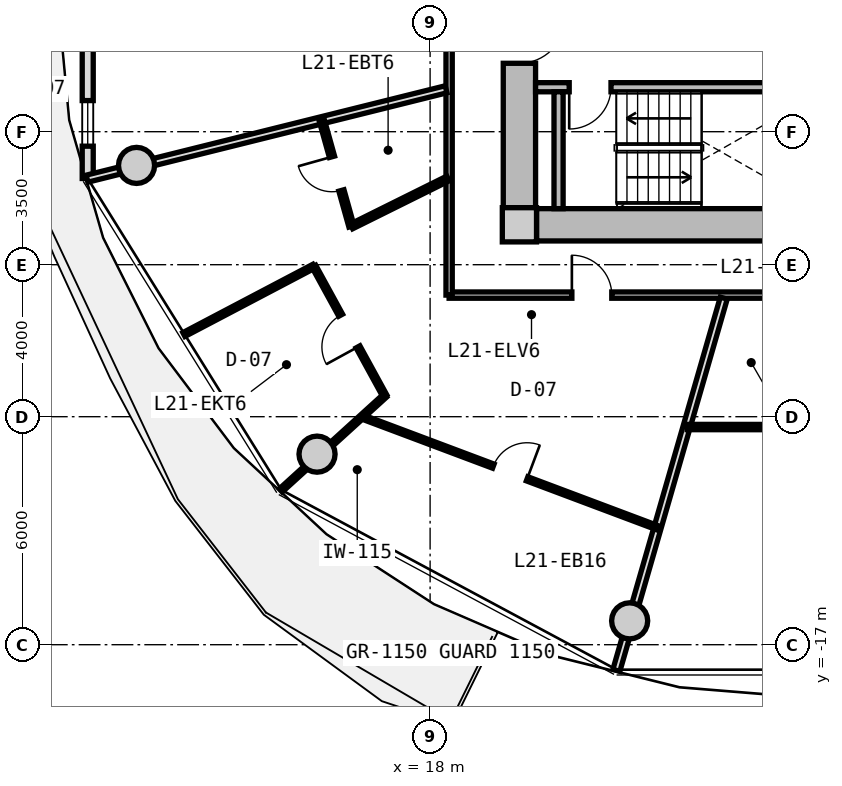
"""IFC4 building model, lengths in metres.
Left out: names, types, materials, properties, quantities, classifications, styles, units other than length and angle.
Written with IfcOpenShell. Run it as: python <this file> out.ifc"""

import sys

from ifc_helpers import new_model, si_unit, direction, frame, frame_2d, origin, origin_2d, place, context, subcontext, project, spatial, rectangle, circle, extrude, source, transform, mapped, element, fill, save


model = new_model("IFC4")
c1 = context("Model", 3, precision=1e-05, world=origin(), true_north=direction((0.0, 1.0)))
c2 = subcontext(c1, "Body", "Model", "MODEL_VIEW")
j1 = project(units=[si_unit("LENGTHUNIT", "METRE"), si_unit("PLANEANGLEUNIT", "RADIAN")], contexts=[c1])
p1 = place(None, origin())
s1 = spatial("IfcSite", under=j1, at=p1, CompositionType="ELEMENT")
p2 = place(p1, origin())
s2 = spatial("IfcBuilding", under=s1, at=p2, CompositionType="ELEMENT")
p3 = place(p2, frame((0.0, 0.0, 70.4)))
s3 = spatial("IfcBuildingStorey", under=s2, at=p3, CompositionType="ELEMENT", Elevation=70.4)
m1 = source(origin(), c2, "Body", "SweptSolid", [
    extrude(rectangle(XDim=0.9, YDim=0.9, at=origin_2d()), origin(), (0.0, 0.0, 1.0), 3.05),
])
p4 = place(p3, frame((20.35, -5.95, 0.0), z_axis=(0.0, 0.0, 1.0), x_axis=(1.0, 0.0, 0.0)))
e1 = element("IfcColumn", 1, at=p4, inside=s3, PredefinedType="COLUMN", context=c2, shape_type="MappedRepresentation", body=[
    mapped(m1, transform((0.0, 0.0, 0.0), x_axis=(1.0, 0.0, 0.0), y_axis=(0.0, 1.0, 0.0), z_axis=(0.0, 0.0, 1.0), scale=1.0)),
])
m2 = source(origin(), c2, "Body", "SweptSolid", [
    extrude(rectangle(XDim=14.4, YDim=0.85, at=frame_2d((7.2, 0.0))), origin(), (0.0, 0.0, 1.0), 2.73),
])
p5 = place(p3, frame((35.2, -5.95, 0.0), z_axis=(0.0, 0.0, 1.0), x_axis=(-1.0, 0.0, 0.0)))
e2 = element("IfcWall", 2, at=p5, inside=s3, PredefinedType="SHEAR", context=c2, shape_type="MappedRepresentation", body=[
    mapped(m2, transform((0.0, 0.0, 0.0), x_axis=(1.0, 0.0, 0.0), y_axis=(0.0, 1.0, 0.0), z_axis=(0.0, 0.0, 1.0), scale=1.0)),
])
m3 = source(origin(), c2, "Body", "SweptSolid", [
    extrude(rectangle(XDim=11.0, YDim=0.85, at=frame_2d((5.5, 0.0))), origin(), (0.0, 0.0, 1.0), 2.73),
])
p6 = place(p3, frame((20.35, -5.5, 0.0), z_axis=(0.0, 0.0, 1.0), x_axis=(0.0, 1.0, 0.0)))
e3 = element("IfcWall", 3, at=p6, inside=s3, PredefinedType="SHEAR", context=c2, shape_type="MappedRepresentation", body=[
    mapped(m3, transform((0.0, 0.0, 0.0), x_axis=(1.0, 0.0, 0.0), y_axis=(0.0, 1.0, 0.0), z_axis=(0.0, 0.0, 1.0), scale=1.0)),
])
p7 = place(p6, frame((3.8, 0.0, 0.0)))
e4 = element("IfcOpeningElement", 4, at=p7, cuts=e3, PredefinedType="OPENING", context=c2, shape_type="SweptSolid", body=[
    extrude(rectangle(XDim=1.2, YDim=2.15, at=frame_2d((0.6, 1.075))), frame((0.0, 0.435, 0.0), z_axis=(0.0, -1.0, 0.0), x_axis=(1.0, 0.0, 0.0)), (0.0, 0.0, 1.0), 0.87),
])
m4 = source(origin(), c2, "Body", "SweptSolid", [
    extrude(circle(Radius=0.475, at=origin_2d()), origin(), (0.0, 0.0, 1.0), 3.05),
])
for number, where, z_axis, x_axis in (
    (5, (10.275, -4.387, 0.0), (0.0, 0.0, 1.0), (1.0, 0.0, 0.0)),
    (6, (15.025, -11.985, 0.0), (0.0, 0.0, 1.0), (1.0, 0.0, 0.0)),
    (7, (23.251, -16.373, 0.0), (0.0, 0.0, 1.0), (1.0, 0.0, 0.0)),
):
    element("IfcColumn", number, at=place(p3, frame(where, z_axis=z_axis, x_axis=x_axis)), inside=s3, PredefinedType="COLUMN", context=c2, shape_type="MappedRepresentation", body=[
        mapped(m4, transform((0.0, 0.0, 0.0), x_axis=(1.0, 0.0, 0.0), y_axis=(0.0, 1.0, 0.0), z_axis=(0.0, 0.0, 1.0), scale=1.0)),
    ])
m5 = source(origin(), c2, "Body", "SweptSolid", [
    extrude(rectangle(XDim=9.462, YDim=0.29, at=frame_2d((4.731, 0.0))), origin(), (0.0, 0.0, 1.0), 2.73),
])
p8 = place(p3, frame((8.99, -4.731, 0.0), z_axis=(0.0, 0.0, 1.0), x_axis=(0.0, 1.0, 0.0)))
e8 = element("IfcWall", 8, at=p8, inside=s3, PredefinedType="SOLIDWALL", context=c2, shape_type="MappedRepresentation", body=[
    mapped(m5, transform((0.0, 0.0, 0.0), x_axis=(1.0, 0.0, 0.0), y_axis=(0.0, 1.0, 0.0), z_axis=(0.0, 0.0, 1.0), scale=1.0)),
])
p9 = place(p8, frame((7.3, 0.0, 0.0)))
e9 = element("IfcOpeningElement", 9, at=p9, cuts=e8, PredefinedType="OPENING", context=c2, shape_type="SweptSolid", body=[
    extrude(rectangle(XDim=1.15, YDim=2.25, at=frame_2d((0.575, 1.125))), frame((0.0, 0.155, 0.0), z_axis=(0.0, -1.0, 0.0), x_axis=(1.0, 0.0, 0.0)), (0.0, 0.0, 1.0), 0.31),
])
p10 = place(p8, frame((0.85, 0.0, 0.85)))
e10 = element("IfcOpeningElement", 10, at=p10, cuts=e8, PredefinedType="OPENING", context=c2, shape_type="SweptSolid", body=[
    extrude(rectangle(XDim=1.2, YDim=1.5, at=frame_2d((0.6, 0.75))), frame((0.0, 0.155, 0.0), z_axis=(0.0, -1.0, 0.0), x_axis=(1.0, 0.0, 0.0)), (0.0, 0.0, 1.0), 0.31),
])
m6 = source(origin(), c2, "Body", "SweptSolid", [
    extrude(rectangle(XDim=7.765, YDim=0.24, at=frame_2d((3.883, 0.0))), origin(), (0.0, 0.0, 1.0), 2.73),
])
p11 = place(p3, frame((20.775, -2.33, 0.0), z_axis=(0.0, 0.0, 1.0), x_axis=(1.0, 0.0, 0.0)))
e11 = element("IfcWall", 11, at=p11, inside=s3, PredefinedType="PARTITIONING", context=c2, shape_type="MappedRepresentation", body=[
    mapped(m6, transform((0.0, 0.0, 0.0), x_axis=(1.0, 0.0, 0.0), y_axis=(0.0, 1.0, 0.0), z_axis=(0.0, 0.0, 1.0), scale=1.0)),
])
p12 = place(p11, frame((0.885, 0.0, 0.0)))
e12 = element("IfcOpeningElement", 12, at=p12, cuts=e11, PredefinedType="OPENING", context=c2, shape_type="SweptSolid", body=[
    extrude(rectangle(XDim=1.1, YDim=2.15, at=frame_2d((0.55, 1.075))), frame((0.0, 0.13, 0.0), z_axis=(0.0, -1.0, 0.0), x_axis=(1.0, 0.0, 0.0)), (0.0, 0.0, 1.0), 0.26),
])
m7 = source(origin(), c2, "Body", "SweptSolid", [
    extrude(rectangle(XDim=3.075, YDim=0.24, at=frame_2d((1.538, 0.0))), origin(), (0.0, 0.0, 1.0), 2.73),
])
p13 = place(p3, frame((21.38, -5.525, 0.0), z_axis=(0.0, 0.0, 1.0), x_axis=(0.0, 1.0, 0.0)))
e13 = element("IfcWall", 13, at=p13, inside=s3, PredefinedType="PARTITIONING", context=c2, shape_type="MappedRepresentation", body=[
    mapped(m7, transform((0.0, 0.0, 0.0), x_axis=(1.0, 0.0, 0.0), y_axis=(0.0, 1.0, 0.0), z_axis=(0.0, 0.0, 1.0), scale=1.0)),
])
m8 = source(origin(), c2, "Body", "SweptSolid", [
    extrude(rectangle(XDim=19.0, YDim=0.165, at=frame_2d((9.5, 0.0))), origin(), (0.0, 0.0, 1.0), 2.715),
])
p14 = place(p3, frame((37.5, -7.8, 0.0), z_axis=(0.0, 0.0, 1.0), x_axis=(-1.0, 0.0, 0.0)))
e14 = element("IfcWall", 14, at=p14, inside=s3, PredefinedType="PARTITIONING", context=c2, shape_type="MappedRepresentation", body=[
    mapped(m8, transform((0.0, 0.0, 0.0), x_axis=(1.0, 0.0, 0.0), y_axis=(0.0, 1.0, 0.0), z_axis=(0.0, 0.0, 1.0), scale=1.0)),
])
p15 = place(p14, frame((14.72, 0.0, 0.0)))
e15 = element("IfcOpeningElement", 15, at=p15, cuts=e14, PredefinedType="OPENING", context=c2, shape_type="SweptSolid", body=[
    extrude(rectangle(XDim=1.05, YDim=2.15, at=frame_2d((0.525, 1.075))), frame((0.0, 0.093, 0.0), z_axis=(0.0, -1.0, 0.0), x_axis=(1.0, 0.0, 0.0)), (0.0, 0.0, 1.0), 0.185),
])
p16 = place(p14, frame((4.847, 0.0, 0.0)))
e16 = element("IfcOpeningElement", 16, at=p16, cuts=e14, PredefinedType="OPENING", context=c2, shape_type="SweptSolid", body=[
    extrude(rectangle(XDim=1.05, YDim=2.15, at=frame_2d((0.525, 1.075))), frame((0.0, 0.093, 0.0), z_axis=(0.0, -1.0, 0.0), x_axis=(1.0, 0.0, 0.0)), (0.0, 0.0, 1.0), 0.185),
])
m9 = source(origin(), c2, "Body", "SweptSolid", [
    extrude(rectangle(XDim=15.6, YDim=0.165, at=frame_2d((7.8, 0.0))), origin(), (0.0, 0.0, 1.0), 2.715),
])
p17 = place(p3, frame((18.5, -7.8, 0.0), z_axis=(0.0, 0.0, 1.0), x_axis=(0.0, 1.0, 0.0)))
e17 = element("IfcWall", 17, at=p17, inside=s3, PredefinedType="PARTITIONING", context=c2, shape_type="MappedRepresentation", body=[
    mapped(m9, transform((0.0, 0.0, 0.0), x_axis=(1.0, 0.0, 0.0), y_axis=(0.0, 1.0, 0.0), z_axis=(0.0, 0.0, 1.0), scale=1.0)),
])
p18 = place(p17, frame((14.215, 0.0, 0.0)))
e18 = element("IfcOpeningElement", 18, at=p18, cuts=e17, PredefinedType="OPENING", context=c2, shape_type="SweptSolid", body=[
    extrude(rectangle(XDim=0.92, YDim=2.1, at=frame_2d((0.46, 1.05))), frame((0.0, 0.093, 0.0), z_axis=(0.0, -1.0, 0.0), x_axis=(1.0, 0.0, 0.0)), (0.0, 0.0, 1.0), 0.185),
])
p19 = place(p17, frame((11.609, 0.0, 0.0)))
e19 = element("IfcOpeningElement", 19, at=p19, cuts=e17, PredefinedType="OPENING", context=c2, shape_type="SweptSolid", body=[
    extrude(rectangle(XDim=0.92, YDim=2.1, at=frame_2d((0.46, 1.05))), frame((0.0, 0.093, 0.0), z_axis=(0.0, -1.0, 0.0), x_axis=(1.0, 0.0, 0.0)), (0.0, 0.0, 1.0), 0.185),
])
p20 = place(p17, frame((7.175, 0.0, 0.0)))
e20 = element("IfcOpeningElement", 20, at=p20, cuts=e17, PredefinedType="OPENING", context=c2, shape_type="SweptSolid", body=[
    extrude(rectangle(XDim=1.25, YDim=2.2, at=frame_2d((0.625, 1.1))), frame((0.0, 0.093, 0.0), z_axis=(0.0, -1.0, 0.0), x_axis=(1.0, 0.0, 0.0)), (0.0, 0.0, 1.0), 0.185),
])
m10 = source(origin(), c2, "Body", "SweptSolid", [
    extrude(rectangle(XDim=9.737, YDim=0.19, at=frame_2d((4.869, 0.0))), origin(), (0.0, 0.0, 1.0), 2.165),
])
p21 = place(p3, frame((18.42, -2.385, 0.0), z_axis=(0.0, 0.0, 1.0), x_axis=(-0.970392716238, -0.241532557375, 0.0)))
e21 = element("IfcWall", 21, at=p21, inside=s3, PredefinedType="PARTITIONING", context=c2, shape_type="MappedRepresentation", body=[
    mapped(m10, transform((0.0, 0.0, 0.0), x_axis=(1.0, 0.0, 0.0), y_axis=(0.0, 1.0, 0.0), z_axis=(0.0, 0.0, 1.0), scale=1.0)),
])
m11 = source(origin(), c2, "Body", "SweptSolid", [
    extrude(rectangle(XDim=10.196, YDim=0.19, at=frame_2d((5.098, 0.0))), origin(), (0.0, 0.0, 1.0), 2.165),
])
p22 = place(p3, frame((25.727, -7.88, 0.0), z_axis=(0.0, 0.0, 1.0), x_axis=(-0.277136420347, -0.960830580549, 0.0)))
e22 = element("IfcWall", 22, at=p22, inside=s3, PredefinedType="PARTITIONING", context=c2, shape_type="MappedRepresentation", body=[
    mapped(m11, transform((0.0, 0.0, 0.0), x_axis=(1.0, 0.0, 0.0), y_axis=(0.0, 1.0, 0.0), z_axis=(0.0, 0.0, 1.0), scale=1.0)),
])
m12 = source(origin(), c2, "Body", "SweptSolid", [
    extrude(rectangle(XDim=8.32, YDim=0.115, at=frame_2d((4.16, 0.0))), origin(), (0.0, 0.0, 1.0), 2.715),
])
p23 = place(p3, frame((16.214, -11.006, 0.0), z_axis=(0.0, 0.0, 1.0), x_axis=(0.936180763098, -0.351518959382, 0.0)))
e23 = element("IfcWall", 23, at=p23, inside=s3, PredefinedType="PARTITIONING", context=c2, shape_type="MappedRepresentation", body=[
    mapped(m12, transform((0.0, 0.0, 0.0), x_axis=(1.0, 0.0, 0.0), y_axis=(0.0, 1.0, 0.0), z_axis=(0.0, 0.0, 1.0), scale=1.0)),
])
p24 = place(p23, frame((3.685, 0.0, 0.0)))
e24 = element("IfcOpeningElement", 24, at=p24, cuts=e23, PredefinedType="OPENING", context=c2, shape_type="SweptSolid", body=[
    extrude(rectangle(XDim=0.95, YDim=2.1, at=frame_2d((0.475, 1.05))), frame((0.0, 0.067, 0.0), z_axis=(0.0, -1.0, 0.0), x_axis=(1.0, 0.0, 0.0)), (0.0, 0.0, 1.0), 0.135),
])
m13 = source(origin(), c2, "Body", "SweptSolid", [
    extrude(rectangle(XDim=3.713, YDim=0.115, at=frame_2d((1.856, 0.0))), origin(), (0.0, 0.0, 1.0), 2.165),
])
p25 = place(p3, frame((16.817, -10.442, 0.0), z_axis=(0.0, 0.0, 1.0), x_axis=(-0.739877587881, -0.67274152165, 0.0)))
e25 = element("IfcWall", 25, at=p25, inside=s3, PredefinedType="PARTITIONING", context=c2, shape_type="MappedRepresentation", body=[
    mapped(m13, transform((0.0, 0.0, 0.0), x_axis=(1.0, 0.0, 0.0), y_axis=(0.0, 1.0, 0.0), z_axis=(0.0, 0.0, 1.0), scale=1.0)),
])
m14 = source(origin(), c2, "Body", "SweptSolid", [
    extrude(rectangle(XDim=2.834, YDim=0.14, at=frame_2d((1.417, 0.0))), origin(), (0.0, 0.0, 1.0), 2.715),
])
p26 = place(p3, frame((18.47, -4.732, 0.0), z_axis=(0.0, 0.0, 1.0), x_axis=(-0.895681174462, -0.444696788513, 0.0)))
e26 = element("IfcWall", 26, at=p26, inside=s3, PredefinedType="PARTITIONING", context=c2, shape_type="MappedRepresentation", body=[
    mapped(m14, transform((0.0, 0.0, 0.0), x_axis=(1.0, 0.0, 0.0), y_axis=(0.0, 1.0, 0.0), z_axis=(0.0, 0.0, 1.0), scale=1.0)),
])
m15 = source(origin(), c2, "Body", "SweptSolid", [
    extrude(rectangle(XDim=2.885, YDim=0.14, at=frame_2d((1.442, 0.0))), origin(), (0.0, 0.0, 1.0), 2.715),
])
p27 = place(p3, frame((15.931, -5.992, 0.0), z_axis=(0.0, 0.0, 1.0), x_axis=(-0.269799431837, 0.962916541856, 0.0)))
e27 = element("IfcWall", 27, at=p27, inside=s3, PredefinedType="PARTITIONING", context=c2, shape_type="MappedRepresentation", body=[
    mapped(m15, transform((0.0, 0.0, 0.0), x_axis=(1.0, 0.0, 0.0), y_axis=(0.0, 1.0, 0.0), z_axis=(0.0, 0.0, 1.0), scale=1.0)),
])
p28 = place(p27, frame((0.982, 0.0, 0.0)))
e28 = element("IfcOpeningElement", 28, at=p28, cuts=e27, PredefinedType="OPENING", context=c2, shape_type="SweptSolid", body=[
    extrude(rectangle(XDim=0.92, YDim=2.1, at=frame_2d((0.46, 1.05))), frame((0.0, 0.08, 0.0), z_axis=(0.0, -1.0, 0.0), x_axis=(1.0, 0.0, 0.0)), (0.0, 0.0, 1.0), 0.16),
])
m16 = source(origin(), c2, "Body", "SweptSolid", [
    extrude(rectangle(XDim=3.864, YDim=0.115, at=frame_2d((1.932, 0.0))), origin(), (0.0, 0.0, 1.0), 2.715),
])
p29 = place(p3, frame((14.94, -7.041, 0.0), z_axis=(0.0, 0.0, 1.0), x_axis=(-0.885194959803, -0.465220252289, 0.0)))
e29 = element("IfcWall", 29, at=p29, inside=s3, PredefinedType="PARTITIONING", context=c2, shape_type="MappedRepresentation", body=[
    mapped(m16, transform((0.0, 0.0, 0.0), x_axis=(1.0, 0.0, 0.0), y_axis=(0.0, 1.0, 0.0), z_axis=(0.0, 0.0, 1.0), scale=1.0)),
])
m17 = source(origin(), c2, "Body", "SweptSolid", [
    extrude(rectangle(XDim=3.888, YDim=0.115, at=frame_2d((1.944, 0.0))), origin(), (0.0, 0.0, 1.0), 2.715),
])
p30 = place(p3, frame((14.94, -7.041, 0.0), z_axis=(0.0, 0.0, 1.0), x_axis=(0.480382482853, -0.877059103007, 0.0)))
e30 = element("IfcWall", 30, at=p30, inside=s3, PredefinedType="PARTITIONING", context=c2, shape_type="MappedRepresentation", body=[
    mapped(m17, transform((0.0, 0.0, 0.0), x_axis=(1.0, 0.0, 0.0), y_axis=(0.0, 1.0, 0.0), z_axis=(0.0, 0.0, 1.0), scale=1.0)),
])
p31 = place(p30, frame((1.469, 0.0, 0.0)))
e31 = element("IfcOpeningElement", 31, at=p31, cuts=e30, PredefinedType="OPENING", context=c2, shape_type="SweptSolid", body=[
    extrude(rectangle(XDim=0.95, YDim=2.1, at=frame_2d((0.475, 1.05))), frame((0.0, 0.067, 0.0), z_axis=(0.0, -1.0, 0.0), x_axis=(1.0, 0.0, 0.0)), (0.0, 0.0, 1.0), 0.135),
])
m18 = source(origin(), c2, "Body", "SweptSolid", [
    extrude(rectangle(XDim=2.813, YDim=0.14, at=frame_2d((1.406, 0.0))), origin(), (0.0, 0.0, 1.0), 2.715),
])
p32 = place(p3, frame((27.578, -11.273, 0.0), z_axis=(0.0, 0.0, 1.0), x_axis=(-0.99999981542, 0.000607586035, 0.0)))
e32 = element("IfcWall", 32, at=p32, inside=s3, PredefinedType="PARTITIONING", context=c2, shape_type="MappedRepresentation", body=[
    mapped(m18, transform((0.0, 0.0, 0.0), x_axis=(1.0, 0.0, 0.0), y_axis=(0.0, 1.0, 0.0), z_axis=(0.0, 0.0, 1.0), scale=1.0)),
])
m19 = source(origin(), c2, "Body", "SweptSolid", [
    extrude(rectangle(XDim=1.2, YDim=1.5, at=frame_2d((0.6, 0.75))), frame((0.0, 0.03, 0.0), z_axis=(0.0, -1.0, 0.0), x_axis=(1.0, 0.0, 0.0)), (0.0, 0.0, 1.0), 0.06),
])
p33 = place(p10, origin())
e33 = element("IfcWindow", 33, at=p33, inside=s3, PartitioningType="SINGLE_PANEL", PredefinedType="WINDOW", context=c2, shape_type="MappedRepresentation", body=[
    mapped(m19, transform((0.0, 0.0, 0.0), x_axis=(1.0, 0.0, 0.0), y_axis=(0.0, 1.0, 0.0), z_axis=(0.0, 0.0, 1.0), scale=1.0)),
])
fill(e10, e33)
m20 = source(origin(), c2, "Body", "SweptSolid", [
    extrude(rectangle(XDim=1.1, YDim=2.15, at=frame_2d((0.55, 1.075))), frame((0.0, 0.025, 0.0), z_axis=(0.0, -1.0, 0.0), x_axis=(1.0, 0.0, 0.0)), (0.0, 0.0, 1.0), 0.05),
])
p34 = place(p12, frame((1.1, 0.0, 0.0), z_axis=(0.0, 0.0, 1.0), x_axis=(-1.0, 0.0, 0.0)))
e34 = element("IfcDoor", 34, at=p34, inside=s3, OperationType="SINGLE_SWING_RIGHT", PredefinedType="DOOR", context=c2, shape_type="MappedRepresentation", body=[
    mapped(m20, transform((0.0, 0.0, 0.0), x_axis=(1.0, 0.0, 0.0), y_axis=(0.0, 1.0, 0.0), z_axis=(0.0, 0.0, 1.0), scale=1.0)),
])
fill(e12, e34)
m21 = source(origin(), c2, "Body", "SweptSolid", [
    extrude(rectangle(XDim=1.2, YDim=2.15, at=frame_2d((0.6, 1.075))), frame((0.0, 0.025, 0.0), z_axis=(0.0, -1.0, 0.0), x_axis=(1.0, 0.0, 0.0)), (0.0, 0.0, 1.0), 0.05),
])
p35 = place(p7, frame((1.2, 0.0, 0.0), z_axis=(0.0, 0.0, 1.0), x_axis=(-1.0, 0.0, 0.0)))
e35 = element("IfcDoor", 35, at=p35, inside=s3, OperationType="SINGLE_SWING_LEFT", PredefinedType="DOOR", context=c2, shape_type="MappedRepresentation", body=[
    mapped(m21, transform((0.0, 0.0, 0.0), x_axis=(1.0, 0.0, 0.0), y_axis=(0.0, 1.0, 0.0), z_axis=(0.0, 0.0, 1.0), scale=1.0)),
])
fill(e4, e35)
m22 = source(origin(), c2, "Body", "SweptSolid", [
    extrude(rectangle(XDim=1.05, YDim=2.15, at=frame_2d((0.525, 1.075))), frame((0.0, 0.025, 0.0), z_axis=(0.0, -1.0, 0.0), x_axis=(1.0, 0.0, 0.0)), (0.0, 0.0, 1.0), 0.05),
])
p36 = place(p15, frame((1.05, 0.0, 0.0), z_axis=(0.0, 0.0, 1.0), x_axis=(-1.0, 0.0, 0.0)))
e36 = element("IfcDoor", 36, at=p36, inside=s3, OperationType="SINGLE_SWING_LEFT", PredefinedType="DOOR", context=c2, shape_type="MappedRepresentation", body=[
    mapped(m22, transform((0.0, 0.0, 0.0), x_axis=(1.0, 0.0, 0.0), y_axis=(0.0, 1.0, 0.0), z_axis=(0.0, 0.0, 1.0), scale=1.0)),
])
fill(e15, e36)
m23 = source(origin(), c2, "Body", "SweptSolid", [
    extrude(rectangle(XDim=0.92, YDim=2.1, at=frame_2d((0.46, 1.05))), frame((0.0, 0.025, 0.0), z_axis=(0.0, -1.0, 0.0), x_axis=(1.0, 0.0, 0.0)), (0.0, 0.0, 1.0), 0.05),
])
p37 = place(p28, origin())
e37 = element("IfcDoor", 37, at=p37, inside=s3, OperationType="SINGLE_SWING_RIGHT", PredefinedType="DOOR", context=c2, shape_type="MappedRepresentation", body=[
    mapped(m23, transform((0.0, 0.0, 0.0), x_axis=(1.0, 0.0, 0.0), y_axis=(0.0, 1.0, 0.0), z_axis=(0.0, 0.0, 1.0), scale=1.0)),
])
fill(e28, e37)
m24 = source(origin(), c2, "Body", "SweptSolid", [
    extrude(rectangle(XDim=0.95, YDim=2.1, at=frame_2d((0.475, 1.05))), frame((0.0, 0.025, 0.0), z_axis=(0.0, -1.0, 0.0), x_axis=(1.0, 0.0, 0.0)), (0.0, 0.0, 1.0), 0.05),
])
p38 = place(p31, frame((0.95, 0.0, 0.0), z_axis=(0.0, 0.0, 1.0), x_axis=(-1.0, 0.0, 0.0)))
e38 = element("IfcDoor", 38, at=p38, inside=s3, OperationType="SINGLE_SWING_LEFT", PredefinedType="DOOR", context=c2, shape_type="MappedRepresentation", body=[
    mapped(m24, transform((0.0, 0.0, 0.0), x_axis=(1.0, 0.0, 0.0), y_axis=(0.0, 1.0, 0.0), z_axis=(0.0, 0.0, 1.0), scale=1.0)),
])
fill(e31, e38)
p39 = place(p24, origin())
e39 = element("IfcDoor", 39, at=p39, inside=s3, OperationType="SINGLE_SWING_RIGHT", PredefinedType="DOOR", context=c2, shape_type="MappedRepresentation", body=[
    mapped(m24, transform((0.0, 0.0, 0.0), x_axis=(1.0, 0.0, 0.0), y_axis=(0.0, 1.0, 0.0), z_axis=(0.0, 0.0, 1.0), scale=1.0)),
])
fill(e24, e39)
save(model, sys.argv[1])
